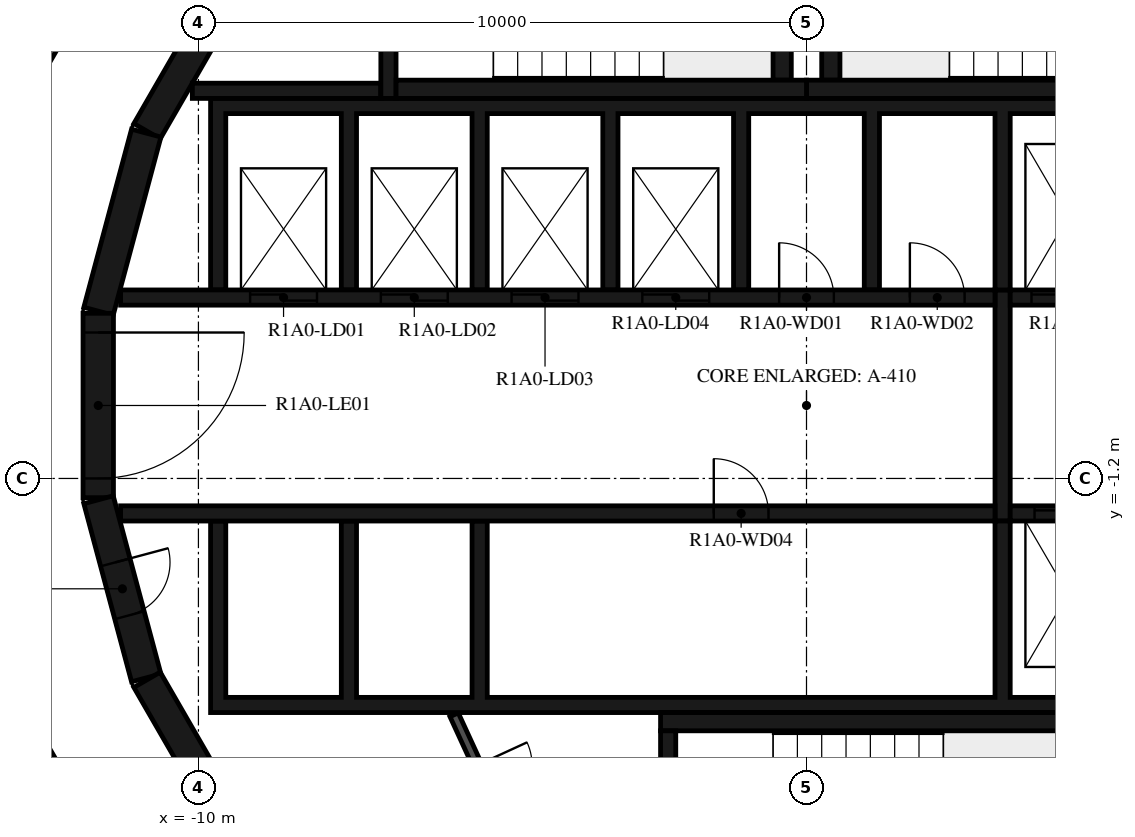
"""IFC4 building model, lengths in metres.
Left out: names, types, materials, properties, quantities, classifications, styles, units other than length and angle.
Written with IfcOpenShell. Run it as: python <this file> out.ifc"""

import sys

from ifc_helpers import new_model, si_unit, direction, frame, frame_2d, origin, place, context, subcontext, project, spatial, polyline, rectangle, outline, extrude, element, fill, save


model = new_model("IFC4")
c1 = context("Model", 3, precision=1e-05, world=origin(), true_north=direction((0.0, 1.0)))
c2 = subcontext(c1, "Body", "Model", "MODEL_VIEW")
j1 = project(units=[si_unit("LENGTHUNIT", "METRE"), si_unit("PLANEANGLEUNIT", "RADIAN")], contexts=[c1])
p1 = place(None, origin())
s1 = spatial("IfcSite", under=j1, at=p1, CompositionType="ELEMENT")
p2 = place(p1, origin())
s2 = spatial("IfcBuilding", under=s1, at=p2, CompositionType="ELEMENT")
p3 = place(p2, frame((0.0, 0.0, 45.4)))
s3 = spatial("IfcBuildingStorey", under=s2, at=p3, CompositionType="ELEMENT", Elevation=45.4)
for number, where, z_axis, x_axis in (
    (1, (-9.329, 7.137, 0.0), (0.0, 0.0, 1.0), (-0.5, -0.866, 0.0)),
    (2, (-10.858, 4.479, 0.0), (0.0, 0.0, 1.0), (-0.259, -0.966, 0.0)),
):
    element("IfcWall", number, at=place(p3, frame(where, z_axis=z_axis, x_axis=x_axis)), inside=s3, PredefinedType="SHEAR", context=c2, shape_type="SweptSolid", body=[
        extrude(rectangle(XDim=3.033, YDim=0.5, at=frame_2d((1.516, 0.0))), origin(), (0.0, 0.0, 1.0), 3.12),
    ])
p4 = place(p3, frame((-11.647, 1.516, 0.0), z_axis=(0.0, 0.0, 1.0), x_axis=(0.0, -1.0, 0.0)))
e3 = element("IfcWall", 3, at=p4, inside=s3, PredefinedType="SHEAR", context=c2, shape_type="SweptSolid", body=[
    extrude(rectangle(XDim=3.033, YDim=0.5, at=frame_2d((1.516, 0.0))), origin(), (0.0, 0.0, 1.0), 3.12),
])
p5 = place(p4, frame((0.316, 0.0, 0.0)))
e4 = element("IfcOpeningElement", 4, at=p5, cuts=e3, PredefinedType="OPENING", context=c2, shape_type="SweptSolid", body=[
    extrude(rectangle(XDim=2.4, YDim=2.1, at=frame_2d((1.2, 1.05))), frame((0.0, 0.26, 0.0), z_axis=(0.0, -1.0, 0.0), x_axis=(1.0, 0.0, 0.0)), (0.0, 0.0, 1.0), 0.52),
])
p6 = place(p3, frame((-11.643, -1.55, 0.0), z_axis=(0.0, 0.0, 1.0), x_axis=(0.258734743916, -0.965948410781, 0.0)))
e5 = element("IfcWall", 5, at=p6, inside=s3, PredefinedType="SHEAR", context=c2, shape_type="SweptSolid", body=[
    extrude(rectangle(XDim=3.033, YDim=0.5, at=frame_2d((1.516, 0.0))), origin(), (0.0, 0.0, 1.0), 3.12),
])
p7 = place(p6, frame((1.066, 0.0, 0.0)))
e6 = element("IfcOpeningElement", 6, at=p7, cuts=e5, PredefinedType="OPENING", context=c2, shape_type="SweptSolid", body=[
    extrude(rectangle(XDim=0.9, YDim=2.1, at=frame_2d((0.45, 1.05))), frame((0.0, 0.26, 0.0), z_axis=(0.0, -1.0, 0.0), x_axis=(1.0, 0.0, 0.0)), (0.0, 0.0, 1.0), 0.52),
])
p8 = place(p3, frame((-10.845, -4.51, 0.0), z_axis=(0.0, 0.0, 1.0), x_axis=(0.500087131594, -0.865975092491, 0.0)))
e7 = element("IfcWall", 7, at=p8, inside=s3, PredefinedType="SHEAR", context=c2, shape_type="SweptSolid", body=[
    extrude(rectangle(XDim=3.033, YDim=0.5, at=frame_2d((1.516, 0.0))), origin(), (0.0, 0.0, 1.0), 3.12),
])
p9 = place(p3, frame((0.0, 5.2, 0.0), z_axis=(0.0, 0.0, 1.0), x_axis=(1.0, 0.0, 0.0)))
e8 = element("IfcWall", 8, at=p9, inside=s3, PredefinedType="SHEAR", context=c2, shape_type="SweptSolid", body=[
    extrude(rectangle(XDim=6.75, YDim=0.3, at=frame_2d((3.375, 0.0))), origin(), (0.0, 0.0, 1.0), 3.12),
])
p10 = place(p3, frame((0.4, 5.35, 0.0), z_axis=(0.0, 0.0, 1.0), x_axis=(0.0, 1.0, 0.0)))
e9 = element("IfcWall", 9, at=p10, inside=s3, PredefinedType="SHEAR", context=c2, shape_type="SweptSolid", body=[
    extrude(rectangle(XDim=3.32, YDim=0.3, at=frame_2d((1.66, 0.0))), origin(), (0.0, 0.0, 1.0), 3.12),
])
p11 = place(p3, frame((-6.75, 5.2, 0.0), z_axis=(0.0, 0.0, 1.0), x_axis=(1.0, 0.0, 0.0)))
e10 = element("IfcWall", 10, at=p11, inside=s3, PredefinedType="SHEAR", context=c2, shape_type="SweptSolid", body=[
    extrude(rectangle(XDim=6.75, YDim=0.3, at=frame_2d((3.375, 0.0))), origin(), (0.0, 0.0, 1.0), 3.12),
])
p12 = place(p3, frame((-0.4, 5.35, 0.0), z_axis=(0.0, 0.0, 1.0), x_axis=(0.0, 1.0, 0.0)))
e11 = element("IfcWall", 11, at=p12, inside=s3, PredefinedType="SHEAR", context=c2, shape_type="SweptSolid", body=[
    extrude(rectangle(XDim=3.32, YDim=0.3, at=frame_2d((1.66, 0.0))), origin(), (0.0, 0.0, 1.0), 3.12),
])
p13 = place(p3, frame((-6.875, 8.97, 0.0), z_axis=(0.0, 0.0, 1.0), x_axis=(0.0, -1.0, 0.0)))
e12 = element("IfcWall", 12, at=p13, inside=s3, PredefinedType="SHEAR", context=c2, shape_type="SweptSolid", body=[
    extrude(rectangle(XDim=3.92, YDim=0.25, at=frame_2d((1.96, 0.0))), origin(), (0.0, 0.0, 1.0), 3.12),
])
p14 = place(p13, frame((1.61, 0.0, 0.0)))
e13 = element("IfcOpeningElement", 13, at=p14, cuts=e12, PredefinedType="OPENING", context=c2, shape_type="SweptSolid", body=[
    extrude(rectangle(XDim=1.2, YDim=2.1, at=frame_2d((0.6, 1.05))), frame((0.0, 0.135, 0.0), z_axis=(0.0, -1.0, 0.0), x_axis=(1.0, 0.0, 0.0)), (0.0, 0.0, 1.0), 0.27),
])
p15 = place(p3, frame((-7.0, 5.175, 0.0), z_axis=(0.0, 0.0, 1.0), x_axis=(-1.0, 0.0, 0.0)))
e14 = element("IfcWall", 14, at=p15, inside=s3, PredefinedType="SHEAR", context=c2, shape_type="SweptSolid", body=[
    extrude(rectangle(XDim=3.1, YDim=0.25, at=frame_2d((1.55, 0.0))), origin(), (0.0, 0.0, 1.0), 3.12),
])
p16 = place(p3, frame((-2.275, -8.67, 0.0), z_axis=(0.0, 0.0, 1.0), x_axis=(0.0, 1.0, 0.0)))
e15 = element("IfcWall", 15, at=p16, inside=s3, PredefinedType="SHEAR", context=c2, shape_type="SweptSolid", body=[
    extrude(rectangle(XDim=3.32, YDim=0.25, at=frame_2d((1.66, 0.0))), origin(), (0.0, 0.0, 1.0), 3.12),
])
p17 = place(p3, frame((-2.4, -5.2, 0.0), z_axis=(0.0, 0.0, 1.0), x_axis=(1.0, 0.0, 0.0)))
e16 = element("IfcWall", 16, at=p17, inside=s3, PredefinedType="SHEAR", context=c2, shape_type="SweptSolid", body=[
    extrude(rectangle(XDim=7.05, YDim=0.3, at=frame_2d((3.525, 0.0))), origin(), (0.0, 0.0, 1.0), 3.12),
])
p18 = place(p3, origin())
e17 = element("IfcWall", 17, at=p18, inside=s3, PredefinedType="SHEAR", context=c2, shape_type="SweptSolid", body=[
    extrude(outline(polyline([(-9.55, 4.8), (-7.65, 4.8), (-7.65, 1.9), (-7.4, 1.9), (-7.4, 4.8), (-5.5, 4.8), (-5.5, 1.9), (-5.25, 1.9), (-5.25, 4.8), (-3.35, 4.8), (-3.35, 1.9), (-3.1, 1.9), (-3.1, 4.8), (-1.2, 4.8), (-1.2, 1.9), (-0.95, 1.9), (-0.95, 4.8), (0.95, 4.8), (0.95, 1.9), (1.2, 1.9), (1.2, 4.8), (3.1, 4.8), (3.1, 1.9), (3.35, 1.9), (3.35, 4.8), (5.25, 4.8), (5.25, 1.9), (5.5, 1.9), (5.5, 4.8), (7.4, 4.8), (7.4, 1.9), (7.65, 1.9), (7.65, 4.8), (9.55, 4.8), (9.55, 1.9), (9.8, 1.9), (9.8, 4.8), (9.8, 5.05), (-9.8, 5.05), (-9.8, 4.8), (-9.8, 1.9), (-9.55, 1.9), (-9.55, 4.8)])), origin(), (0.0, 0.0, 1.0), 3.12),
])
p19 = place(p3, origin())
e18 = element("IfcWall", 18, at=p19, inside=s3, PredefinedType="SHEAR", context=c2, shape_type="SweptSolid", body=[
    extrude(outline(polyline([(9.8, -5.05), (9.8, -4.8), (9.8, -1.9), (9.55, -1.9), (9.55, -4.8), (7.65, -4.8), (7.65, -1.9), (7.4, -1.9), (7.4, -4.8), (5.5, -4.8), (5.5, -1.9), (5.25, -1.9), (5.25, -4.8), (3.35, -4.8), (3.35, -1.9), (3.1, -1.9), (3.1, -4.8), (-5.25, -4.8), (-5.25, -1.9), (-5.5, -1.9), (-5.5, -4.8), (-7.4, -4.8), (-7.4, -1.9), (-7.65, -1.9), (-7.65, -4.8), (-9.55, -4.8), (-9.55, -1.9), (-9.8, -1.9), (-9.8, -4.8), (-9.8, -5.05), (9.8, -5.05)])), origin(), (0.0, 0.0, 1.0), 3.12),
])
p20 = place(p3, frame((-11.28, 1.775, 0.0), z_axis=(0.0, 0.0, 1.0), x_axis=(1.0, 0.0, 0.0)))
e19 = element("IfcWall", 19, at=p20, inside=s3, PredefinedType="SHEAR", context=c2, shape_type="SweptSolid", body=[
    extrude(rectangle(XDim=14.38, YDim=0.25, at=frame_2d((7.19, 0.0))), origin(), (0.0, 0.0, 1.0), 3.12),
])
p21 = place(p20, frame((2.13, 0.0, 0.0)))
e20 = element("IfcOpeningElement", 20, at=p21, cuts=e19, PredefinedType="OPENING", context=c2, shape_type="SweptSolid", body=[
    extrude(rectangle(XDim=1.1, YDim=2.1, at=frame_2d((0.55, 1.05))), frame((0.0, 0.135, 0.0), z_axis=(0.0, -1.0, 0.0), x_axis=(1.0, 0.0, 0.0)), (0.0, 0.0, 1.0), 0.27),
])
p22 = place(p20, frame((4.28, 0.0, 0.0)))
e21 = element("IfcOpeningElement", 21, at=p22, cuts=e19, PredefinedType="OPENING", context=c2, shape_type="SweptSolid", body=[
    extrude(rectangle(XDim=1.1, YDim=2.1, at=frame_2d((0.55, 1.05))), frame((0.0, 0.135, 0.0), z_axis=(0.0, -1.0, 0.0), x_axis=(1.0, 0.0, 0.0)), (0.0, 0.0, 1.0), 0.27),
])
p23 = place(p20, frame((6.43, 0.0, 0.0)))
e22 = element("IfcOpeningElement", 22, at=p23, cuts=e19, PredefinedType="OPENING", context=c2, shape_type="SweptSolid", body=[
    extrude(rectangle(XDim=1.1, YDim=2.1, at=frame_2d((0.55, 1.05))), frame((0.0, 0.135, 0.0), z_axis=(0.0, -1.0, 0.0), x_axis=(1.0, 0.0, 0.0)), (0.0, 0.0, 1.0), 0.27),
])
p24 = place(p20, frame((8.58, 0.0, 0.0)))
e23 = element("IfcOpeningElement", 23, at=p24, cuts=e19, PredefinedType="OPENING", context=c2, shape_type="SweptSolid", body=[
    extrude(rectangle(XDim=1.1, YDim=2.1, at=frame_2d((0.55, 1.05))), frame((0.0, 0.135, 0.0), z_axis=(0.0, -1.0, 0.0), x_axis=(1.0, 0.0, 0.0)), (0.0, 0.0, 1.0), 0.27),
])
p25 = place(p20, frame((10.83, 0.0, 0.0)))
e24 = element("IfcOpeningElement", 24, at=p25, cuts=e19, PredefinedType="OPENING", context=c2, shape_type="SweptSolid", body=[
    extrude(rectangle(XDim=0.9, YDim=2.1, at=frame_2d((0.45, 1.05))), frame((0.0, 0.135, 0.0), z_axis=(0.0, -1.0, 0.0), x_axis=(1.0, 0.0, 0.0)), (0.0, 0.0, 1.0), 0.27),
])
p26 = place(p20, frame((12.98, 0.0, 0.0)))
e25 = element("IfcOpeningElement", 25, at=p26, cuts=e19, PredefinedType="OPENING", context=c2, shape_type="SweptSolid", body=[
    extrude(rectangle(XDim=0.9, YDim=2.1, at=frame_2d((0.45, 1.05))), frame((0.0, 0.135, 0.0), z_axis=(0.0, -1.0, 0.0), x_axis=(1.0, 0.0, 0.0)), (0.0, 0.0, 1.0), 0.27),
])
p27 = place(p3, frame((3.35, 1.775, 0.0), z_axis=(0.0, 0.0, 1.0), x_axis=(1.0, 0.0, 0.0)))
e26 = element("IfcWall", 26, at=p27, inside=s3, PredefinedType="SHEAR", context=c2, shape_type="SweptSolid", body=[
    extrude(rectangle(XDim=7.93, YDim=0.25, at=frame_2d((3.965, 0.0))), origin(), (0.0, 0.0, 1.0), 3.12),
])
p28 = place(p27, frame((0.35, 0.0, 0.0)))
e27 = element("IfcOpeningElement", 27, at=p28, cuts=e26, PredefinedType="OPENING", context=c2, shape_type="SweptSolid", body=[
    extrude(rectangle(XDim=1.2, YDim=2.4, at=frame_2d((0.6, 1.2))), frame((0.0, 0.135, 0.0), z_axis=(0.0, -1.0, 0.0), x_axis=(1.0, 0.0, 0.0)), (0.0, 0.0, 1.0), 0.27),
])
p29 = place(p27, frame((2.5, 0.0, 0.0)))
e28 = element("IfcOpeningElement", 28, at=p29, cuts=e26, PredefinedType="OPENING", context=c2, shape_type="SweptSolid", body=[
    extrude(rectangle(XDim=1.2, YDim=2.4, at=frame_2d((0.6, 1.2))), frame((0.0, 0.135, 0.0), z_axis=(0.0, -1.0, 0.0), x_axis=(1.0, 0.0, 0.0)), (0.0, 0.0, 1.0), 0.27),
])
p30 = place(p27, frame((4.8, 0.0, 0.0)))
e29 = element("IfcOpeningElement", 29, at=p30, cuts=e26, PredefinedType="OPENING", context=c2, shape_type="SweptSolid", body=[
    extrude(rectangle(XDim=0.9, YDim=2.1, at=frame_2d((0.45, 1.05))), frame((0.0, 0.135, 0.0), z_axis=(0.0, -1.0, 0.0), x_axis=(1.0, 0.0, 0.0)), (0.0, 0.0, 1.0), 0.27),
])
p31 = place(p3, frame((-11.28, -1.775, 0.0), z_axis=(0.0, 0.0, 1.0), x_axis=(1.0, 0.0, 0.0)))
e30 = element("IfcWall", 30, at=p31, inside=s3, PredefinedType="SHEAR", context=c2, shape_type="SweptSolid", body=[
    extrude(rectangle(XDim=14.38, YDim=0.25, at=frame_2d((7.19, 0.0))), origin(), (0.0, 0.0, 1.0), 3.12),
])
p32 = place(p31, frame((9.755, 0.0, 0.0)))
e31 = element("IfcOpeningElement", 31, at=p32, cuts=e30, PredefinedType="OPENING", context=c2, shape_type="SweptSolid", body=[
    extrude(rectangle(XDim=0.9, YDim=2.1, at=frame_2d((0.45, 1.05))), frame((0.0, 0.135, 0.0), z_axis=(0.0, -1.0, 0.0), x_axis=(1.0, 0.0, 0.0)), (0.0, 0.0, 1.0), 0.27),
])
p33 = place(p3, frame((3.35, -1.775, 0.0), z_axis=(0.0, 0.0, 1.0), x_axis=(1.0, 0.0, 0.0)))
e32 = element("IfcWall", 32, at=p33, inside=s3, PredefinedType="SHEAR", context=c2, shape_type="SweptSolid", body=[
    extrude(rectangle(XDim=7.93, YDim=0.25, at=frame_2d((3.965, 0.0))), origin(), (0.0, 0.0, 1.0), 3.12),
])
p34 = place(p33, frame((0.4, 0.0, 0.0)))
e33 = element("IfcOpeningElement", 33, at=p34, cuts=e32, PredefinedType="OPENING", context=c2, shape_type="SweptSolid", body=[
    extrude(rectangle(XDim=1.1, YDim=2.4, at=frame_2d((0.55, 1.2))), frame((0.0, 0.135, 0.0), z_axis=(0.0, -1.0, 0.0), x_axis=(1.0, 0.0, 0.0)), (0.0, 0.0, 1.0), 0.27),
])
p35 = place(p33, frame((2.55, 0.0, 0.0)))
e34 = element("IfcOpeningElement", 34, at=p35, cuts=e32, PredefinedType="OPENING", context=c2, shape_type="SweptSolid", body=[
    extrude(rectangle(XDim=1.1, YDim=2.4, at=frame_2d((0.55, 1.2))), frame((0.0, 0.135, 0.0), z_axis=(0.0, -1.0, 0.0), x_axis=(1.0, 0.0, 0.0)), (0.0, 0.0, 1.0), 0.27),
])
p36 = place(p33, frame((4.7, 0.0, 0.0)))
e35 = element("IfcOpeningElement", 35, at=p36, cuts=e32, PredefinedType="OPENING", context=c2, shape_type="SweptSolid", body=[
    extrude(rectangle(XDim=1.1, YDim=2.4, at=frame_2d((0.55, 1.2))), frame((0.0, 0.135, 0.0), z_axis=(0.0, -1.0, 0.0), x_axis=(1.0, 0.0, 0.0)), (0.0, 0.0, 1.0), 0.27),
])
p37 = place(p3, frame((3.225, -1.9, 0.0), z_axis=(0.0, 0.0, 1.0), x_axis=(0.0, 1.0, 0.0)))
e36 = element("IfcWall", 36, at=p37, inside=s3, PredefinedType="SHEAR", context=c2, shape_type="SweptSolid", body=[
    extrude(rectangle(XDim=3.8, YDim=0.25, at=frame_2d((1.9, 0.0))), origin(), (0.0, 0.0, 1.0), 3.12),
])
p38 = place(p3, frame((-5.795, -5.086, 0.0), z_axis=(0.0, 0.0, 1.0), x_axis=(0.417887867606, -0.908498613157, 0.0)))
e37 = element("IfcWall", 37, at=p38, inside=s3, PredefinedType="PARTITIONING", context=c2, shape_type="SweptSolid", body=[
    extrude(rectangle(XDim=2.726, YDim=0.15, at=frame_2d((1.363, 0.0))), origin(), (0.0, 0.0, 1.0), 3.12),
])
p39 = place(p38, frame((0.913, 0.0, 0.0)))
e38 = element("IfcOpeningElement", 38, at=p39, cuts=e37, PredefinedType="OPENING", context=c2, shape_type="SweptSolid", body=[
    extrude(rectangle(XDim=0.9, YDim=2.1, at=frame_2d((0.45, 1.05))), frame((0.0, 0.085, 0.0), z_axis=(0.0, -1.0, 0.0), x_axis=(1.0, 0.0, 0.0)), (0.0, 0.0, 1.0), 0.17),
])
p40 = place(p3, frame((-10.029, 10.029, 0.0), z_axis=(0.0, 0.0, 1.0), x_axis=(-0.500001669485, -0.866024439905, 0.0)))
e39 = element("IfcWall", 39, at=p40, inside=s3, PredefinedType="STANDARD", context=c2, shape_type="SweptSolid", body=[
    extrude(rectangle(XDim=7.342, YDim=0.2, at=frame_2d((3.671, 0.0))), origin(), (0.0, 0.0, 1.0), 3.12),
])
p41 = place(p40, frame((0.2, 0.0, 0.0)))
e40 = element("IfcOpeningElement", 40, at=p41, cuts=e39, PredefinedType="OPENING", context=c2, shape_type="SweptSolid", body=[
    extrude(rectangle(XDim=1.0, YDim=2.1, at=frame_2d((0.5, 1.05))), frame((0.0, 0.11, 0.0), z_axis=(0.0, -1.0, 0.0), x_axis=(1.0, 0.0, 0.0)), (0.0, 0.0, 1.0), 0.22),
])
p42 = place(p3, frame((-13.7, -3.671, 0.0), z_axis=(0.0, 0.0, 1.0), x_axis=(0.500001669485, -0.866024439905, 0.0)))
e41 = element("IfcWall", 41, at=p42, inside=s3, PredefinedType="STANDARD", context=c2, shape_type="SweptSolid", body=[
    extrude(rectangle(XDim=7.342, YDim=0.2, at=frame_2d((3.671, 0.0))), origin(), (0.0, 0.0, 1.0), 3.12),
])
p43 = place(p5, origin())
e42 = element("IfcDoor", 42, at=p43, inside=s3, OperationType="DOUBLE_DOOR_SINGLE_SWING", PredefinedType="DOOR", context=c2, shape_type="SweptSolid", body=[
    extrude(rectangle(XDim=2.4, YDim=2.1, at=frame_2d((1.2, 1.05))), frame((0.0, 0.025, 0.0), z_axis=(0.0, -1.0, 0.0), x_axis=(1.0, 0.0, 0.0)), (0.0, 0.0, 1.0), 0.05),
])
fill(e4, e42)
p44 = place(p21, origin())
e43 = element("IfcDoor", 43, at=p44, inside=s3, OperationType="DOUBLE_DOOR_SLIDING", PredefinedType="DOOR", context=c2, shape_type="SweptSolid", body=[
    extrude(rectangle(XDim=1.1, YDim=2.1, at=frame_2d((0.55, 1.05))), frame((0.0, 0.025, 0.0), z_axis=(0.0, -1.0, 0.0), x_axis=(1.0, 0.0, 0.0)), (0.0, 0.0, 1.0), 0.05),
])
fill(e20, e43)
p45 = place(p22, origin())
e44 = element("IfcDoor", 44, at=p45, inside=s3, OperationType="DOUBLE_DOOR_SLIDING", PredefinedType="DOOR", context=c2, shape_type="SweptSolid", body=[
    extrude(rectangle(XDim=1.1, YDim=2.1, at=frame_2d((0.55, 1.05))), frame((0.0, 0.025, 0.0), z_axis=(0.0, -1.0, 0.0), x_axis=(1.0, 0.0, 0.0)), (0.0, 0.0, 1.0), 0.05),
])
fill(e21, e44)
p46 = place(p23, origin())
e45 = element("IfcDoor", 45, at=p46, inside=s3, OperationType="DOUBLE_DOOR_SLIDING", PredefinedType="DOOR", context=c2, shape_type="SweptSolid", body=[
    extrude(rectangle(XDim=1.1, YDim=2.1, at=frame_2d((0.55, 1.05))), frame((0.0, 0.025, 0.0), z_axis=(0.0, -1.0, 0.0), x_axis=(1.0, 0.0, 0.0)), (0.0, 0.0, 1.0), 0.05),
])
fill(e22, e45)
p47 = place(p24, origin())
e46 = element("IfcDoor", 46, at=p47, inside=s3, OperationType="DOUBLE_DOOR_SLIDING", PredefinedType="DOOR", context=c2, shape_type="SweptSolid", body=[
    extrude(rectangle(XDim=1.1, YDim=2.1, at=frame_2d((0.55, 1.05))), frame((0.0, 0.025, 0.0), z_axis=(0.0, -1.0, 0.0), x_axis=(1.0, 0.0, 0.0)), (0.0, 0.0, 1.0), 0.05),
])
fill(e23, e46)
p48 = place(p28, origin())
e47 = element("IfcDoor", 47, at=p48, inside=s3, OperationType="DOUBLE_DOOR_SLIDING", PredefinedType="DOOR", context=c2, shape_type="SweptSolid", body=[
    extrude(rectangle(XDim=1.2, YDim=2.4, at=frame_2d((0.6, 1.2))), frame((0.0, 0.025, 0.0), z_axis=(0.0, -1.0, 0.0), x_axis=(1.0, 0.0, 0.0)), (0.0, 0.0, 1.0), 0.05),
])
fill(e27, e47)
p49 = place(p34, origin())
e48 = element("IfcDoor", 48, at=p49, inside=s3, OperationType="DOUBLE_DOOR_SLIDING", PredefinedType="DOOR", context=c2, shape_type="SweptSolid", body=[
    extrude(rectangle(XDim=1.1, YDim=2.4, at=frame_2d((0.55, 1.2))), frame((0.0, 0.025, 0.0), z_axis=(0.0, -1.0, 0.0), x_axis=(1.0, 0.0, 0.0)), (0.0, 0.0, 1.0), 0.05),
])
fill(e33, e48)
p50 = place(p25, origin())
e49 = element("IfcDoor", 49, at=p50, inside=s3, OperationType="SINGLE_SWING_RIGHT", PredefinedType="DOOR", context=c2, shape_type="SweptSolid", body=[
    extrude(rectangle(XDim=0.9, YDim=2.1, at=frame_2d((0.45, 1.05))), frame((0.0, 0.025, 0.0), z_axis=(0.0, -1.0, 0.0), x_axis=(1.0, 0.0, 0.0)), (0.0, 0.0, 1.0), 0.05),
])
fill(e24, e49)
p51 = place(p26, origin())
e50 = element("IfcDoor", 50, at=p51, inside=s3, OperationType="SINGLE_SWING_LEFT", PredefinedType="DOOR", context=c2, shape_type="SweptSolid", body=[
    extrude(rectangle(XDim=0.9, YDim=2.1, at=frame_2d((0.45, 1.05))), frame((0.0, 0.025, 0.0), z_axis=(0.0, -1.0, 0.0), x_axis=(1.0, 0.0, 0.0)), (0.0, 0.0, 1.0), 0.05),
])
fill(e25, e50)
p52 = place(p32, origin())
e51 = element("IfcDoor", 51, at=p52, inside=s3, OperationType="SINGLE_SWING_LEFT", PredefinedType="DOOR", context=c2, shape_type="SweptSolid", body=[
    extrude(rectangle(XDim=0.9, YDim=2.1, at=frame_2d((0.45, 1.05))), frame((0.0, 0.025, 0.0), z_axis=(0.0, -1.0, 0.0), x_axis=(1.0, 0.0, 0.0)), (0.0, 0.0, 1.0), 0.05),
])
fill(e31, e51)
p53 = place(p7, origin())
e52 = element("IfcDoor", 52, at=p53, inside=s3, OperationType="SINGLE_SWING_RIGHT", PredefinedType="DOOR", context=c2, shape_type="SweptSolid", body=[
    extrude(rectangle(XDim=0.9, YDim=2.1, at=frame_2d((0.45, 1.05))), frame((0.0, 0.025, 0.0), z_axis=(0.0, -1.0, 0.0), x_axis=(1.0, 0.0, 0.0)), (0.0, 0.0, 1.0), 0.05),
])
fill(e6, e52)
save(model, sys.argv[1])
